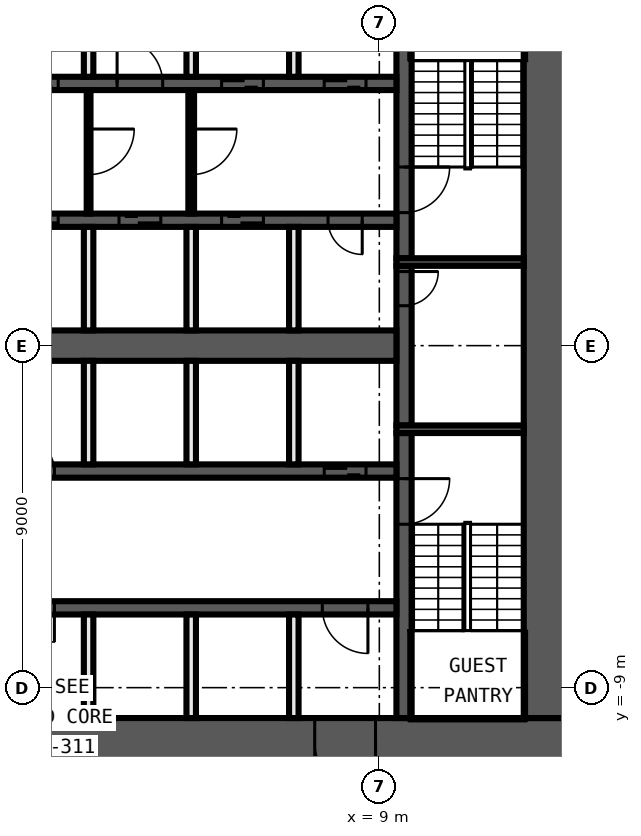
"""IFC4 building model, lengths in metres.
Left out: names, types, materials, properties, quantities, classifications, styles, units other than length and angle.
Written with IfcOpenShell. Run it as: python <this file> out.ifc"""

import sys

from ifc_helpers import new_model, si_unit, direction, frame, frame_2d, origin, place, context, subcontext, project, spatial, rectangle, extrude, element, fill, save


model = new_model("IFC4")
c1 = context("Model", 3, precision=1e-05, world=origin(), true_north=direction((0.0, 1.0)))
c2 = subcontext(c1, "Body", "Model", "MODEL_VIEW")
j1 = project(units=[si_unit("LENGTHUNIT", "METRE"), si_unit("PLANEANGLEUNIT", "RADIAN")], contexts=[c1])
p1 = place(None, origin())
s1 = spatial("IfcSite", under=j1, at=p1, CompositionType="ELEMENT")
p2 = place(p1, origin())
s2 = spatial("IfcBuilding", under=s1, at=p2, CompositionType="ELEMENT")
p3 = place(p2, frame((0.0, 0.0, 77.3)))
s3 = spatial("IfcBuildingStorey", under=s2, at=p3, CompositionType="ELEMENT", Elevation=77.3)
p4 = place(p3, frame((14.0, -10.4, 0.0), z_axis=(0.0, 0.0, 1.0), x_axis=(-1.0, 0.0, 0.0)))
e1 = element("IfcWall", 1, at=p4, inside=s3, PredefinedType="SHEAR", context=c2, shape_type="SweptSolid", body=[
    extrude(rectangle(XDim=28.0, YDim=1.2, at=frame_2d((14.0, 0.0))), origin(), (0.0, 0.0, 1.0), 3.3),
])
p5 = place(p4, frame((5.1, 0.0, 0.0)))
e2 = element("IfcOpeningElement", 2, at=p5, cuts=e1, PredefinedType="OPENING", context=c2, shape_type="SweptSolid", body=[
    extrude(rectangle(XDim=1.6, YDim=2.1, at=frame_2d((0.8, 1.05))), frame((0.0, 0.61, 0.0), z_axis=(0.0, -1.0, 0.0), x_axis=(1.0, 0.0, 0.0)), (0.0, 0.0, 1.0), 1.22),
])
p6 = place(p3, frame((13.4, 9.8, 0.0), z_axis=(0.0, 0.0, 1.0), x_axis=(0.0, -1.0, 0.0)))
e3 = element("IfcWall", 3, at=p6, inside=s3, PredefinedType="SHEAR", context=c2, shape_type="SweptSolid", body=[
    extrude(rectangle(XDim=19.6, YDim=1.2, at=frame_2d((9.8, 0.0))), origin(), (0.0, 0.0, 1.0), 3.3),
])
p7 = place(p3, frame((9.65, -2.3, 0.0), z_axis=(0.0, 0.0, 1.0), x_axis=(0.0, -1.0, 0.0)))
e4 = element("IfcWall", 4, at=p7, inside=s3, PredefinedType="SHEAR", context=c2, shape_type="SweptSolid", body=[
    extrude(rectangle(XDim=7.5, YDim=0.4, at=frame_2d((3.75, 0.0))), origin(), (0.0, 0.0, 1.0), 3.3),
])
p8 = place(p7, frame((1.2, 0.0, 0.0)))
e5 = element("IfcOpeningElement", 5, at=p8, cuts=e4, PredefinedType="OPENING", context=c2, shape_type="SweptSolid", body=[
    extrude(rectangle(XDim=1.2, YDim=2.1, at=frame_2d((0.6, 1.05))), frame((0.0, 0.21, 0.0), z_axis=(0.0, -1.0, 0.0), x_axis=(1.0, 0.0, 0.0)), (0.0, 0.0, 1.0), 0.42),
])
p9 = place(p3, frame((9.65, 2.1, 0.0), z_axis=(0.0, 0.0, 1.0), x_axis=(0.0, -1.0, 0.0)))
e6 = element("IfcWall", 6, at=p9, inside=s3, PredefinedType="SHEAR", context=c2, shape_type="SweptSolid", body=[
    extrude(rectangle(XDim=4.2, YDim=0.4, at=frame_2d((2.1, 0.0))), origin(), (0.0, 0.0, 1.0), 3.3),
])
p10 = place(p9, frame((0.15, 0.0, 0.0)))
e7 = element("IfcOpeningElement", 7, at=p10, cuts=e6, PredefinedType="OPENING", context=c2, shape_type="SweptSolid", body=[
    extrude(rectangle(XDim=0.9, YDim=2.1, at=frame_2d((0.45, 1.05))), frame((0.0, 0.21, 0.0), z_axis=(0.0, -1.0, 0.0), x_axis=(1.0, 0.0, 0.0)), (0.0, 0.0, 1.0), 0.42),
])
p11 = place(p3, frame((9.65, 9.8, 0.0), z_axis=(0.0, 0.0, 1.0), x_axis=(0.0, -1.0, 0.0)))
e8 = element("IfcWall", 8, at=p11, inside=s3, PredefinedType="SHEAR", context=c2, shape_type="SweptSolid", body=[
    extrude(rectangle(XDim=7.5, YDim=0.4, at=frame_2d((3.75, 0.0))), origin(), (0.0, 0.0, 1.0), 3.3),
])
p12 = place(p11, frame((5.1, 0.0, 0.0)))
e9 = element("IfcOpeningElement", 9, at=p12, cuts=e8, PredefinedType="OPENING", context=c2, shape_type="SweptSolid", body=[
    extrude(rectangle(XDim=1.2, YDim=2.1, at=frame_2d((0.6, 1.05))), frame((0.0, 0.21, 0.0), z_axis=(0.0, -1.0, 0.0), x_axis=(1.0, 0.0, 0.0)), (0.0, 0.0, 1.0), 0.42),
])
for number, where, z_axis, x_axis in (
    (10, (9.45, 2.2, 0.0), (0.0, 0.0, 1.0), (1.0, 0.0, 0.0)),
    (11, (9.45, -2.2, 0.0), (0.0, 0.0, 1.0), (1.0, 0.0, 0.0)),
):
    element("IfcWall", number, at=place(p3, frame(where, z_axis=z_axis, x_axis=x_axis)), inside=s3, PredefinedType="SHEAR", context=c2, shape_type="SweptSolid", body=[
        extrude(rectangle(XDim=3.35, YDim=0.2, at=frame_2d((1.675, 0.0))), origin(), (0.0, 0.0, 1.0), 3.3),
    ])
p13 = place(p3, frame((-9.45, 6.9, 0.0), z_axis=(0.0, 0.0, 1.0), x_axis=(1.0, 0.0, 0.0)))
e12 = element("IfcWall", 12, at=p13, inside=s3, PredefinedType="SHEAR", context=c2, shape_type="SweptSolid", body=[
    extrude(rectangle(XDim=18.9, YDim=0.35, at=frame_2d((9.45, 0.0))), origin(), (0.0, 0.0, 1.0), 3.3),
])
p14 = place(p13, frame((0.8, 0.0, 0.0)))
e13 = element("IfcOpeningElement", 13, at=p14, cuts=e12, PredefinedType="OPENING", context=c2, shape_type="SweptSolid", body=[
    extrude(rectangle(XDim=1.1, YDim=2.1, at=frame_2d((0.55, 1.05))), frame((0.0, 0.185, 0.0), z_axis=(0.0, -1.0, 0.0), x_axis=(1.0, 0.0, 0.0)), (0.0, 0.0, 1.0), 0.37),
])
p15 = place(p13, frame((3.5, 0.0, 0.0)))
e14 = element("IfcOpeningElement", 14, at=p15, cuts=e12, PredefinedType="OPENING", context=c2, shape_type="SweptSolid", body=[
    extrude(rectangle(XDim=1.1, YDim=2.1, at=frame_2d((0.55, 1.05))), frame((0.0, 0.185, 0.0), z_axis=(0.0, -1.0, 0.0), x_axis=(1.0, 0.0, 0.0)), (0.0, 0.0, 1.0), 0.37),
])
p16 = place(p13, frame((6.2, 0.0, 0.0)))
e15 = element("IfcOpeningElement", 15, at=p16, cuts=e12, PredefinedType="OPENING", context=c2, shape_type="SweptSolid", body=[
    extrude(rectangle(XDim=1.1, YDim=2.1, at=frame_2d((0.55, 1.05))), frame((0.0, 0.185, 0.0), z_axis=(0.0, -1.0, 0.0), x_axis=(1.0, 0.0, 0.0)), (0.0, 0.0, 1.0), 0.37),
])
p17 = place(p13, frame((8.9, 0.0, 0.0)))
e16 = element("IfcOpeningElement", 16, at=p17, cuts=e12, PredefinedType="OPENING", context=c2, shape_type="SweptSolid", body=[
    extrude(rectangle(XDim=1.1, YDim=2.1, at=frame_2d((0.55, 1.05))), frame((0.0, 0.185, 0.0), z_axis=(0.0, -1.0, 0.0), x_axis=(1.0, 0.0, 0.0)), (0.0, 0.0, 1.0), 0.37),
])
p18 = place(p13, frame((11.55, 0.0, 0.0)))
e17 = element("IfcOpeningElement", 17, at=p18, cuts=e12, PredefinedType="OPENING", context=c2, shape_type="SweptSolid", body=[
    extrude(rectangle(XDim=1.2, YDim=2.1, at=frame_2d((0.6, 1.05))), frame((0.0, 0.185, 0.0), z_axis=(0.0, -1.0, 0.0), x_axis=(1.0, 0.0, 0.0)), (0.0, 0.0, 1.0), 0.37),
])
p19 = place(p13, frame((14.3, 0.0, 0.0)))
e18 = element("IfcOpeningElement", 18, at=p19, cuts=e12, PredefinedType="OPENING", context=c2, shape_type="SweptSolid", body=[
    extrude(rectangle(XDim=1.1, YDim=2.1, at=frame_2d((0.55, 1.05))), frame((0.0, 0.185, 0.0), z_axis=(0.0, -1.0, 0.0), x_axis=(1.0, 0.0, 0.0)), (0.0, 0.0, 1.0), 0.37),
])
p20 = place(p13, frame((17.0, 0.0, 0.0)))
e19 = element("IfcOpeningElement", 19, at=p20, cuts=e12, PredefinedType="OPENING", context=c2, shape_type="SweptSolid", body=[
    extrude(rectangle(XDim=1.1, YDim=2.1, at=frame_2d((0.55, 1.05))), frame((0.0, 0.185, 0.0), z_axis=(0.0, -1.0, 0.0), x_axis=(1.0, 0.0, 0.0)), (0.0, 0.0, 1.0), 0.37),
])
p21 = place(p3, frame((9.45, 3.3, 0.0), z_axis=(0.0, 0.0, 1.0), x_axis=(-1.0, 0.0, 0.0)))
e20 = element("IfcWall", 20, at=p21, inside=s3, PredefinedType="SHEAR", context=c2, shape_type="SweptSolid", body=[
    extrude(rectangle(XDim=18.9, YDim=0.35, at=frame_2d((9.45, 0.0))), origin(), (0.0, 0.0, 1.0), 3.3),
])
p22 = place(p21, frame((17.0, 0.0, 0.0)))
e21 = element("IfcOpeningElement", 21, at=p22, cuts=e20, PredefinedType="OPENING", context=c2, shape_type="SweptSolid", body=[
    extrude(rectangle(XDim=1.1, YDim=2.1, at=frame_2d((0.55, 1.05))), frame((0.0, 0.185, 0.0), z_axis=(0.0, -1.0, 0.0), x_axis=(1.0, 0.0, 0.0)), (0.0, 0.0, 1.0), 0.37),
])
p23 = place(p21, frame((14.3, 0.0, 0.0)))
e22 = element("IfcOpeningElement", 22, at=p23, cuts=e20, PredefinedType="OPENING", context=c2, shape_type="SweptSolid", body=[
    extrude(rectangle(XDim=1.1, YDim=2.1, at=frame_2d((0.55, 1.05))), frame((0.0, 0.185, 0.0), z_axis=(0.0, -1.0, 0.0), x_axis=(1.0, 0.0, 0.0)), (0.0, 0.0, 1.0), 0.37),
])
p24 = place(p21, frame((11.6, 0.0, 0.0)))
e23 = element("IfcOpeningElement", 23, at=p24, cuts=e20, PredefinedType="OPENING", context=c2, shape_type="SweptSolid", body=[
    extrude(rectangle(XDim=1.1, YDim=2.1, at=frame_2d((0.55, 1.05))), frame((0.0, 0.185, 0.0), z_axis=(0.0, -1.0, 0.0), x_axis=(1.0, 0.0, 0.0)), (0.0, 0.0, 1.0), 0.37),
])
p25 = place(p21, frame((8.9, 0.0, 0.0)))
e24 = element("IfcOpeningElement", 24, at=p25, cuts=e20, PredefinedType="OPENING", context=c2, shape_type="SweptSolid", body=[
    extrude(rectangle(XDim=1.1, YDim=2.1, at=frame_2d((0.55, 1.05))), frame((0.0, 0.185, 0.0), z_axis=(0.0, -1.0, 0.0), x_axis=(1.0, 0.0, 0.0)), (0.0, 0.0, 1.0), 0.37),
])
p26 = place(p21, frame((6.2, 0.0, 0.0)))
e25 = element("IfcOpeningElement", 25, at=p26, cuts=e20, PredefinedType="OPENING", context=c2, shape_type="SweptSolid", body=[
    extrude(rectangle(XDim=1.1, YDim=2.1, at=frame_2d((0.55, 1.05))), frame((0.0, 0.185, 0.0), z_axis=(0.0, -1.0, 0.0), x_axis=(1.0, 0.0, 0.0)), (0.0, 0.0, 1.0), 0.37),
])
p27 = place(p21, frame((3.5, 0.0, 0.0)))
e26 = element("IfcOpeningElement", 26, at=p27, cuts=e20, PredefinedType="OPENING", context=c2, shape_type="SweptSolid", body=[
    extrude(rectangle(XDim=1.1, YDim=2.1, at=frame_2d((0.55, 1.05))), frame((0.0, 0.185, 0.0), z_axis=(0.0, -1.0, 0.0), x_axis=(1.0, 0.0, 0.0)), (0.0, 0.0, 1.0), 0.37),
])
p28 = place(p21, frame((0.9, 0.0, 0.0)))
e27 = element("IfcOpeningElement", 27, at=p28, cuts=e20, PredefinedType="OPENING", context=c2, shape_type="SweptSolid", body=[
    extrude(rectangle(XDim=0.9, YDim=2.1, at=frame_2d((0.45, 1.05))), frame((0.0, 0.185, 0.0), z_axis=(0.0, -1.0, 0.0), x_axis=(1.0, 0.0, 0.0)), (0.0, 0.0, 1.0), 0.37),
])
p29 = place(p3, frame((-9.45, -3.3, 0.0), z_axis=(0.0, 0.0, 1.0), x_axis=(1.0, 0.0, 0.0)))
e28 = element("IfcWall", 28, at=p29, inside=s3, PredefinedType="SHEAR", context=c2, shape_type="SweptSolid", body=[
    extrude(rectangle(XDim=18.9, YDim=0.35, at=frame_2d((9.45, 0.0))), origin(), (0.0, 0.0, 1.0), 3.3),
])
p30 = place(p29, frame((17.0, 0.0, 0.0)))
e29 = element("IfcOpeningElement", 29, at=p30, cuts=e28, PredefinedType="OPENING", context=c2, shape_type="SweptSolid", body=[
    extrude(rectangle(XDim=1.1, YDim=2.1, at=frame_2d((0.55, 1.05))), frame((0.0, 0.185, 0.0), z_axis=(0.0, -1.0, 0.0), x_axis=(1.0, 0.0, 0.0)), (0.0, 0.0, 1.0), 0.37),
])
p31 = place(p29, frame((3.6, 0.0, 0.0)))
e30 = element("IfcOpeningElement", 30, at=p31, cuts=e28, PredefinedType="OPENING", context=c2, shape_type="SweptSolid", body=[
    extrude(rectangle(XDim=0.9, YDim=2.1, at=frame_2d((0.45, 1.05))), frame((0.0, 0.185, 0.0), z_axis=(0.0, -1.0, 0.0), x_axis=(1.0, 0.0, 0.0)), (0.0, 0.0, 1.0), 0.37),
])
p32 = place(p29, frame((9.0, 0.0, 0.0)))
e31 = element("IfcOpeningElement", 31, at=p32, cuts=e28, PredefinedType="OPENING", context=c2, shape_type="SweptSolid", body=[
    extrude(rectangle(XDim=0.9, YDim=2.1, at=frame_2d((0.45, 1.05))), frame((0.0, 0.185, 0.0), z_axis=(0.0, -1.0, 0.0), x_axis=(1.0, 0.0, 0.0)), (0.0, 0.0, 1.0), 0.37),
])
p33 = place(p3, frame((9.45, -6.9, 0.0), z_axis=(0.0, 0.0, 1.0), x_axis=(-1.0, 0.0, 0.0)))
e32 = element("IfcWall", 32, at=p33, inside=s3, PredefinedType="SHEAR", context=c2, shape_type="SweptSolid", body=[
    extrude(rectangle(XDim=18.9, YDim=0.35, at=frame_2d((9.45, 0.0))), origin(), (0.0, 0.0, 1.0), 3.3),
])
p34 = place(p33, frame((0.75, 0.0, 0.0)))
e33 = element("IfcOpeningElement", 33, at=p34, cuts=e32, PredefinedType="OPENING", context=c2, shape_type="SweptSolid", body=[
    extrude(rectangle(XDim=1.2, YDim=2.1, at=frame_2d((0.6, 1.05))), frame((0.0, 0.185, 0.0), z_axis=(0.0, -1.0, 0.0), x_axis=(1.0, 0.0, 0.0)), (0.0, 0.0, 1.0), 0.37),
])
p35 = place(p33, frame((14.4, 0.0, 0.0)))
e34 = element("IfcOpeningElement", 34, at=p35, cuts=e32, PredefinedType="OPENING", context=c2, shape_type="SweptSolid", body=[
    extrude(rectangle(XDim=0.9, YDim=2.1, at=frame_2d((0.45, 1.05))), frame((0.0, 0.185, 0.0), z_axis=(0.0, -1.0, 0.0), x_axis=(1.0, 0.0, 0.0)), (0.0, 0.0, 1.0), 0.37),
])
p36 = place(p33, frame((9.0, 0.0, 0.0)))
e35 = element("IfcOpeningElement", 35, at=p36, cuts=e32, PredefinedType="OPENING", context=c2, shape_type="SweptSolid", body=[
    extrude(rectangle(XDim=0.9, YDim=2.1, at=frame_2d((0.45, 1.05))), frame((0.0, 0.185, 0.0), z_axis=(0.0, -1.0, 0.0), x_axis=(1.0, 0.0, 0.0)), (0.0, 0.0, 1.0), 0.37),
])
p37 = place(p3, frame((-9.45, 0.0, 0.0), z_axis=(0.0, 0.0, 1.0), x_axis=(1.0, 0.0, 0.0)))
e36 = element("IfcWall", 36, at=p37, inside=s3, PredefinedType="SHEAR", context=c2, shape_type="SweptSolid", body=[
    extrude(rectangle(XDim=18.9, YDim=0.8, at=frame_2d((9.45, 0.0))), origin(), (0.0, 0.0, 1.0), 3.3),
])
for number, where, z_axis, x_axis in (
    (37, (6.75, -9.8, 0.0), (0.0, 0.0, 1.0), (0.0, 1.0, 0.0)),
    (38, (6.75, -3.125, 0.0), (0.0, 0.0, 1.0), (0.0, 1.0, 0.0)),
    (39, (6.75, 0.4, 0.0), (0.0, 0.0, 1.0), (0.0, 1.0, 0.0)),
    (40, (6.75, 7.075, 0.0), (0.0, 0.0, 1.0), (0.0, 1.0, 0.0)),
):
    element("IfcWall", number, at=place(p3, frame(where, z_axis=z_axis, x_axis=x_axis)), inside=s3, PredefinedType="SOLIDWALL", context=c2, shape_type="SweptSolid", body=[
        extrude(rectangle(XDim=2.725, YDim=0.25, at=frame_2d((1.363, 0.0))), origin(), (0.0, 0.0, 1.0), 3.3),
    ])
p38 = place(p3, frame((4.05, 6.725, 0.0), z_axis=(0.0, 0.0, 1.0), x_axis=(0.0, -1.0, 0.0)))
e41 = element("IfcWall", 41, at=p38, inside=s3, PredefinedType="PARTITIONING", context=c2, shape_type="SweptSolid", body=[
    extrude(rectangle(XDim=3.25, YDim=0.15, at=frame_2d((1.625, 0.0))), origin(), (0.0, 0.0, 1.0), 3.3),
])
p39 = place(p38, frame((1.025, 0.0, 0.0)))
e42 = element("IfcOpeningElement", 42, at=p39, cuts=e41, PredefinedType="OPENING", context=c2, shape_type="SweptSolid", body=[
    extrude(rectangle(XDim=1.2, YDim=2.1, at=frame_2d((0.6, 1.05))), frame((0.0, 0.085, 0.0), z_axis=(0.0, -1.0, 0.0), x_axis=(1.0, 0.0, 0.0)), (0.0, 0.0, 1.0), 0.17),
])
for number, where, z_axis, x_axis in (
    (43, (4.05, -9.8, 0.0), (0.0, 0.0, 1.0), (0.0, 1.0, 0.0)),
    (44, (4.05, -3.125, 0.0), (0.0, 0.0, 1.0), (0.0, 1.0, 0.0)),
    (45, (4.05, 0.4, 0.0), (0.0, 0.0, 1.0), (0.0, 1.0, 0.0)),
    (46, (4.05, 7.075, 0.0), (0.0, 0.0, 1.0), (0.0, 1.0, 0.0)),
):
    element("IfcWall", number, at=place(p3, frame(where, z_axis=z_axis, x_axis=x_axis)), inside=s3, PredefinedType="SOLIDWALL", context=c2, shape_type="SweptSolid", body=[
        extrude(rectangle(XDim=2.725, YDim=0.25, at=frame_2d((1.363, 0.0))), origin(), (0.0, 0.0, 1.0), 3.3),
    ])
p40 = place(p3, frame((1.35, 6.725, 0.0), z_axis=(0.0, 0.0, 1.0), x_axis=(0.0, -1.0, 0.0)))
e47 = element("IfcWall", 47, at=p40, inside=s3, PredefinedType="PARTITIONING", context=c2, shape_type="SweptSolid", body=[
    extrude(rectangle(XDim=3.25, YDim=0.1, at=frame_2d((1.625, 0.0))), origin(), (0.0, 0.0, 1.0), 3.3),
])
p41 = place(p40, frame((1.025, 0.0, 0.0)))
e48 = element("IfcOpeningElement", 48, at=p41, cuts=e47, PredefinedType="OPENING", context=c2, shape_type="SweptSolid", body=[
    extrude(rectangle(XDim=1.2, YDim=2.1, at=frame_2d((0.6, 1.05))), frame((0.0, 0.06, 0.0), z_axis=(0.0, -1.0, 0.0), x_axis=(1.0, 0.0, 0.0)), (0.0, 0.0, 1.0), 0.12),
])
for number, where, z_axis, x_axis in (
    (49, (1.35, -9.8, 0.0), (0.0, 0.0, 1.0), (0.0, 1.0, 0.0)),
    (50, (1.35, -3.125, 0.0), (0.0, 0.0, 1.0), (0.0, 1.0, 0.0)),
    (51, (1.35, 0.4, 0.0), (0.0, 0.0, 1.0), (0.0, 1.0, 0.0)),
    (52, (1.35, 7.075, 0.0), (0.0, 0.0, 1.0), (0.0, 1.0, 0.0)),
):
    element("IfcWall", number, at=place(p3, frame(where, z_axis=z_axis, x_axis=x_axis)), inside=s3, PredefinedType="SOLIDWALL", context=c2, shape_type="SweptSolid", body=[
        extrude(rectangle(XDim=2.725, YDim=0.25, at=frame_2d((1.363, 0.0))), origin(), (0.0, 0.0, 1.0), 3.3),
    ])
p42 = place(p10, origin())
e53 = element("IfcDoor", 53, at=p42, inside=s3, OperationType="SINGLE_SWING_RIGHT", PredefinedType="DOOR", context=c2, shape_type="SweptSolid", body=[
    extrude(rectangle(XDim=0.9, YDim=2.1, at=frame_2d((0.45, 1.05))), frame((0.0, 0.025, 0.0), z_axis=(0.0, -1.0, 0.0), x_axis=(1.0, 0.0, 0.0)), (0.0, 0.0, 1.0), 0.05),
])
fill(e7, e53)
p43 = place(p17, origin())
e54 = element("IfcDoor", 54, at=p43, inside=s3, OperationType="DOUBLE_DOOR_SLIDING", PredefinedType="DOOR", context=c2, shape_type="SweptSolid", body=[
    extrude(rectangle(XDim=1.1, YDim=2.1, at=frame_2d((0.55, 1.05))), frame((0.0, 0.025, 0.0), z_axis=(0.0, -1.0, 0.0), x_axis=(1.0, 0.0, 0.0)), (0.0, 0.0, 1.0), 0.05),
])
fill(e16, e54)
p44 = place(p18, origin())
e55 = element("IfcDoor", 55, at=p44, inside=s3, OperationType="SINGLE_SWING_LEFT", PredefinedType="DOOR", context=c2, shape_type="SweptSolid", body=[
    extrude(rectangle(XDim=1.2, YDim=2.1, at=frame_2d((0.6, 1.05))), frame((0.0, 0.025, 0.0), z_axis=(0.0, -1.0, 0.0), x_axis=(1.0, 0.0, 0.0)), (0.0, 0.0, 1.0), 0.05),
])
fill(e17, e55)
p45 = place(p19, origin())
e56 = element("IfcDoor", 56, at=p45, inside=s3, OperationType="DOUBLE_DOOR_SLIDING", PredefinedType="DOOR", context=c2, shape_type="SweptSolid", body=[
    extrude(rectangle(XDim=1.1, YDim=2.1, at=frame_2d((0.55, 1.05))), frame((0.0, 0.025, 0.0), z_axis=(0.0, -1.0, 0.0), x_axis=(1.0, 0.0, 0.0)), (0.0, 0.0, 1.0), 0.05),
])
fill(e18, e56)
p46 = place(p20, origin())
e57 = element("IfcDoor", 57, at=p46, inside=s3, OperationType="DOUBLE_DOOR_SLIDING", PredefinedType="DOOR", context=c2, shape_type="SweptSolid", body=[
    extrude(rectangle(XDim=1.1, YDim=2.1, at=frame_2d((0.55, 1.05))), frame((0.0, 0.025, 0.0), z_axis=(0.0, -1.0, 0.0), x_axis=(1.0, 0.0, 0.0)), (0.0, 0.0, 1.0), 0.05),
])
fill(e19, e57)
p47 = place(p25, origin())
e58 = element("IfcDoor", 58, at=p47, inside=s3, OperationType="DOUBLE_DOOR_SLIDING", PredefinedType="DOOR", context=c2, shape_type="SweptSolid", body=[
    extrude(rectangle(XDim=1.1, YDim=2.1, at=frame_2d((0.55, 1.05))), frame((0.0, 0.025, 0.0), z_axis=(0.0, -1.0, 0.0), x_axis=(1.0, 0.0, 0.0)), (0.0, 0.0, 1.0), 0.05),
])
fill(e24, e58)
p48 = place(p26, origin())
e59 = element("IfcDoor", 59, at=p48, inside=s3, OperationType="DOUBLE_DOOR_SLIDING", PredefinedType="DOOR", context=c2, shape_type="SweptSolid", body=[
    extrude(rectangle(XDim=1.1, YDim=2.1, at=frame_2d((0.55, 1.05))), frame((0.0, 0.025, 0.0), z_axis=(0.0, -1.0, 0.0), x_axis=(1.0, 0.0, 0.0)), (0.0, 0.0, 1.0), 0.05),
])
fill(e25, e59)
p49 = place(p27, origin())
e60 = element("IfcDoor", 60, at=p49, inside=s3, OperationType="DOUBLE_DOOR_SLIDING", PredefinedType="DOOR", context=c2, shape_type="SweptSolid", body=[
    extrude(rectangle(XDim=1.1, YDim=2.1, at=frame_2d((0.55, 1.05))), frame((0.0, 0.025, 0.0), z_axis=(0.0, -1.0, 0.0), x_axis=(1.0, 0.0, 0.0)), (0.0, 0.0, 1.0), 0.05),
])
fill(e26, e60)
p50 = place(p28, origin())
e61 = element("IfcDoor", 61, at=p50, inside=s3, OperationType="SINGLE_SWING_LEFT", PredefinedType="DOOR", context=c2, shape_type="SweptSolid", body=[
    extrude(rectangle(XDim=0.9, YDim=2.1, at=frame_2d((0.45, 1.05))), frame((0.0, 0.025, 0.0), z_axis=(0.0, -1.0, 0.0), x_axis=(1.0, 0.0, 0.0)), (0.0, 0.0, 1.0), 0.05),
])
fill(e27, e61)
p51 = place(p30, origin())
e62 = element("IfcDoor", 62, at=p51, inside=s3, OperationType="DOUBLE_DOOR_SLIDING", PredefinedType="DOOR", context=c2, shape_type="SweptSolid", body=[
    extrude(rectangle(XDim=1.1, YDim=2.1, at=frame_2d((0.55, 1.05))), frame((0.0, 0.025, 0.0), z_axis=(0.0, -1.0, 0.0), x_axis=(1.0, 0.0, 0.0)), (0.0, 0.0, 1.0), 0.05),
])
fill(e29, e62)
p52 = place(p5, origin())
e63 = element("IfcDoor", 63, at=p52, inside=s3, OperationType="DOUBLE_DOOR_SINGLE_SWING", PredefinedType="DOOR", context=c2, shape_type="SweptSolid", body=[
    extrude(rectangle(XDim=1.6, YDim=2.1, at=frame_2d((0.8, 1.05))), frame((0.0, 0.025, 0.0), z_axis=(0.0, -1.0, 0.0), x_axis=(1.0, 0.0, 0.0)), (0.0, 0.0, 1.0), 0.05),
])
fill(e2, e63)
p53 = place(p34, origin())
e64 = element("IfcDoor", 64, at=p53, inside=s3, OperationType="SINGLE_SWING_LEFT", PredefinedType="DOOR", context=c2, shape_type="SweptSolid", body=[
    extrude(rectangle(XDim=1.2, YDim=2.1, at=frame_2d((0.6, 1.05))), frame((0.0, 0.025, 0.0), z_axis=(0.0, -1.0, 0.0), x_axis=(1.0, 0.0, 0.0)), (0.0, 0.0, 1.0), 0.05),
])
fill(e33, e64)
p54 = place(p32, origin())
e65 = element("IfcDoor", 65, at=p54, inside=s3, OperationType="SINGLE_SWING_LEFT", PredefinedType="DOOR", context=c2, shape_type="SweptSolid", body=[
    extrude(rectangle(XDim=0.9, YDim=2.1, at=frame_2d((0.45, 1.05))), frame((0.0, 0.025, 0.0), z_axis=(0.0, -1.0, 0.0), x_axis=(1.0, 0.0, 0.0)), (0.0, 0.0, 1.0), 0.05),
])
fill(e31, e65)
p55 = place(p36, origin())
e66 = element("IfcDoor", 66, at=p55, inside=s3, OperationType="SINGLE_SWING_LEFT", PredefinedType="DOOR", context=c2, shape_type="SweptSolid", body=[
    extrude(rectangle(XDim=0.9, YDim=2.1, at=frame_2d((0.45, 1.05))), frame((0.0, 0.025, 0.0), z_axis=(0.0, -1.0, 0.0), x_axis=(1.0, 0.0, 0.0)), (0.0, 0.0, 1.0), 0.05),
])
fill(e35, e66)
p56 = place(p12, origin())
e67 = element("IfcDoor", 67, at=p56, inside=s3, OperationType="SINGLE_SWING_LEFT", PredefinedType="DOOR", context=c2, shape_type="SweptSolid", body=[
    extrude(rectangle(XDim=1.2, YDim=2.1, at=frame_2d((0.6, 1.05))), frame((0.0, 0.025, 0.0), z_axis=(0.0, -1.0, 0.0), x_axis=(1.0, 0.0, 0.0)), (0.0, 0.0, 1.0), 0.05),
])
fill(e9, e67)
p57 = place(p8, origin())
e68 = element("IfcDoor", 68, at=p57, inside=s3, OperationType="SINGLE_SWING_RIGHT", PredefinedType="DOOR", context=c2, shape_type="SweptSolid", body=[
    extrude(rectangle(XDim=1.2, YDim=2.1, at=frame_2d((0.6, 1.05))), frame((0.0, 0.025, 0.0), z_axis=(0.0, -1.0, 0.0), x_axis=(1.0, 0.0, 0.0)), (0.0, 0.0, 1.0), 0.05),
])
fill(e5, e68)
p58 = place(p41, origin())
e69 = element("IfcDoor", 69, at=p58, inside=s3, OperationType="SINGLE_SWING_LEFT", PredefinedType="DOOR", context=c2, shape_type="SweptSolid", body=[
    extrude(rectangle(XDim=1.2, YDim=2.1, at=frame_2d((0.6, 1.05))), frame((0.0, 0.025, 0.0), z_axis=(0.0, -1.0, 0.0), x_axis=(1.0, 0.0, 0.0)), (0.0, 0.0, 1.0), 0.05),
])
fill(e48, e69)
p59 = place(p39, origin())
e70 = element("IfcDoor", 70, at=p59, inside=s3, OperationType="SINGLE_SWING_RIGHT", PredefinedType="DOOR", context=c2, shape_type="SweptSolid", body=[
    extrude(rectangle(XDim=1.2, YDim=2.1, at=frame_2d((0.6, 1.05))), frame((0.0, 0.025, 0.0), z_axis=(0.0, -1.0, 0.0), x_axis=(1.0, 0.0, 0.0)), (0.0, 0.0, 1.0), 0.05),
])
fill(e42, e70)
save(model, sys.argv[1])
